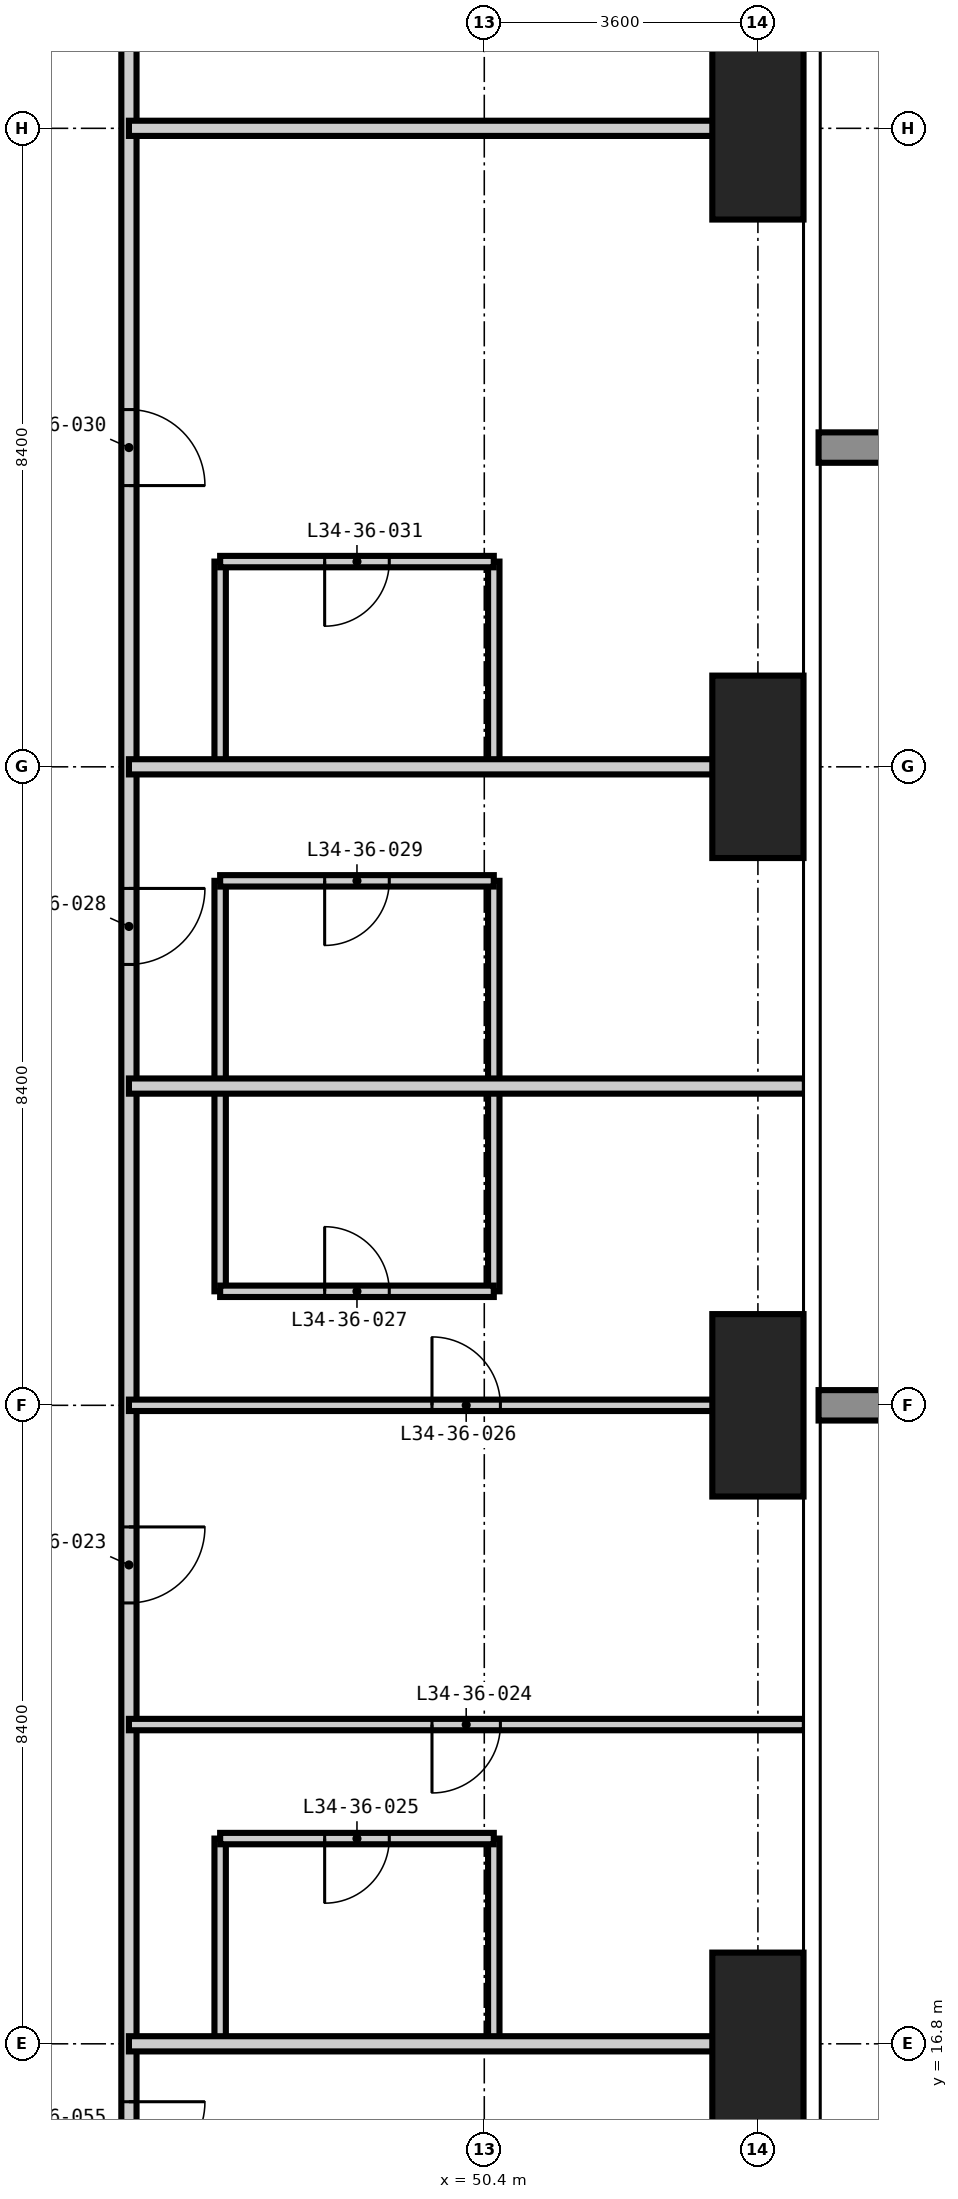
"""IFC4 building model, lengths in metres.
Left out: names, types, materials, properties, quantities, classifications, styles, units other than length and angle.
Written with IfcOpenShell. Run it as: python <this file> out.ifc"""

import sys

from ifc_helpers import new_model, si_unit, direction, frame, frame_2d, origin, origin_2d, place, context, subcontext, project, spatial, rectangle, extrude, element, fill, save


model = new_model("IFC4")
c1 = context("Model", 3, precision=1e-05, world=origin(), true_north=direction((0.0, 1.0)))
c2 = subcontext(c1, "Body", "Model", "MODEL_VIEW")
j1 = project(units=[si_unit("LENGTHUNIT", "METRE"), si_unit("PLANEANGLEUNIT", "RADIAN")], contexts=[c1])
p1 = place(None, origin())
s1 = spatial("IfcSite", under=j1, at=p1, CompositionType="ELEMENT")
p2 = place(p1, origin())
s2 = spatial("IfcBuilding", under=s1, at=p2, CompositionType="ELEMENT")
p3 = place(p2, frame((0.0, 0.0, 133.2)))
s3 = spatial("IfcBuildingStorey", under=s2, at=p3, CompositionType="ELEMENT", Elevation=133.2)
for number, where, z_axis, x_axis in (
    (1, (54.0, 16.8, -0.35), (0.0, 0.0, 1.0), (1.0, 0.0, 0.0)),
    (2, (54.0, 25.2, -0.35), (0.0, 0.0, 1.0), (1.0, 0.0, 0.0)),
    (3, (54.0, 33.6, -0.35), (0.0, 0.0, 1.0), (1.0, 0.0, 0.0)),
    (4, (54.0, 42.0, -0.35), (0.0, 0.0, 1.0), (1.0, 0.0, 0.0)),
):
    element("IfcColumn", number, at=place(p3, frame(where, z_axis=z_axis, x_axis=x_axis)), inside=s3, PredefinedType="COLUMN", context=c2, shape_type="SweptSolid", body=[
        extrude(rectangle(XDim=1.2, YDim=2.4, at=origin_2d()), origin(), (0.0, 0.0, 1.0), 3.6),
    ])
p4 = place(p3, frame((46.925, 16.8, 0.0), z_axis=(0.0, 0.0, 1.0), x_axis=(0.0, 1.0, 0.0)))
e5 = element("IfcWall", 5, at=p4, inside=s3, PredefinedType="PARTITIONING", context=c2, shape_type="SweptSolid", body=[
    extrude(rectangle(XDim=2.7, YDim=0.15, at=frame_2d((1.35, 0.0))), origin(), (0.0, 0.0, 1.0), 3.25),
])
p5 = place(p3, frame((46.925, 26.7, 0.0), z_axis=(0.0, 0.0, 1.0), x_axis=(0.0, 1.0, 0.0)))
e6 = element("IfcWall", 6, at=p5, inside=s3, PredefinedType="PARTITIONING", context=c2, shape_type="SweptSolid", body=[
    extrude(rectangle(XDim=5.4, YDim=0.15, at=frame_2d((2.7, 0.0))), origin(), (0.0, 0.0, 1.0), 3.25),
])
for number, where, z_axis, x_axis in (
    (7, (46.925, 33.6, 0.0), (0.0, 0.0, 1.0), (0.0, 1.0, 0.0)),
    (8, (50.525, 16.8, 0.0), (0.0, 0.0, 1.0), (0.0, 1.0, 0.0)),
):
    element("IfcWall", number, at=place(p3, frame(where, z_axis=z_axis, x_axis=x_axis)), inside=s3, PredefinedType="PARTITIONING", context=c2, shape_type="SweptSolid", body=[
        extrude(rectangle(XDim=2.7, YDim=0.15, at=frame_2d((1.35, 0.0))), origin(), (0.0, 0.0, 1.0), 3.25),
    ])
p6 = place(p3, frame((50.525, 26.7, 0.0), z_axis=(0.0, 0.0, 1.0), x_axis=(0.0, 1.0, 0.0)))
e9 = element("IfcWall", 9, at=p6, inside=s3, PredefinedType="PARTITIONING", context=c2, shape_type="SweptSolid", body=[
    extrude(rectangle(XDim=5.4, YDim=0.15, at=frame_2d((2.7, 0.0))), origin(), (0.0, 0.0, 1.0), 3.25),
])
p7 = place(p3, frame((50.525, 33.6, 0.0), z_axis=(0.0, 0.0, 1.0), x_axis=(0.0, 1.0, 0.0)))
e10 = element("IfcWall", 10, at=p7, inside=s3, PredefinedType="PARTITIONING", context=c2, shape_type="SweptSolid", body=[
    extrude(rectangle(XDim=2.7, YDim=0.15, at=frame_2d((1.35, 0.0))), origin(), (0.0, 0.0, 1.0), 3.25),
])
p8 = place(p3, frame((46.925, 19.5, 0.0), z_axis=(0.0, 0.0, 1.0), x_axis=(1.0, 0.0, 0.0)))
e11 = element("IfcWall", 11, at=p8, inside=s3, PredefinedType="PARTITIONING", context=c2, shape_type="SweptSolid", body=[
    extrude(rectangle(XDim=3.6, YDim=0.15, at=frame_2d((1.8, 0.0))), origin(), (0.0, 0.0, 1.0), 3.25),
])
p9 = place(p8, frame((1.375, 0.0, 0.0)))
e12 = element("IfcOpeningElement", 12, at=p9, cuts=e11, PredefinedType="OPENING", context=c2, shape_type="SweptSolid", body=[
    extrude(rectangle(XDim=0.85, YDim=2.1, at=frame_2d((0.425, 1.05))), frame((0.0, 0.085, 0.0), z_axis=(0.0, -1.0, 0.0), x_axis=(1.0, 0.0, 0.0)), (0.0, 0.0, 1.0), 0.17),
])
p10 = place(p3, frame((46.925, 26.7, 0.0), z_axis=(0.0, 0.0, 1.0), x_axis=(1.0, 0.0, 0.0)))
e13 = element("IfcWall", 13, at=p10, inside=s3, PredefinedType="PARTITIONING", context=c2, shape_type="SweptSolid", body=[
    extrude(rectangle(XDim=3.6, YDim=0.15, at=frame_2d((1.8, 0.0))), origin(), (0.0, 0.0, 1.0), 3.25),
])
p11 = place(p10, frame((1.375, 0.0, 0.0)))
e14 = element("IfcOpeningElement", 14, at=p11, cuts=e13, PredefinedType="OPENING", context=c2, shape_type="SweptSolid", body=[
    extrude(rectangle(XDim=0.85, YDim=2.1, at=frame_2d((0.425, 1.05))), frame((0.0, 0.085, 0.0), z_axis=(0.0, -1.0, 0.0), x_axis=(1.0, 0.0, 0.0)), (0.0, 0.0, 1.0), 0.17),
])
p12 = place(p3, frame((46.925, 32.1, 0.0), z_axis=(0.0, 0.0, 1.0), x_axis=(1.0, 0.0, 0.0)))
e15 = element("IfcWall", 15, at=p12, inside=s3, PredefinedType="PARTITIONING", context=c2, shape_type="SweptSolid", body=[
    extrude(rectangle(XDim=3.6, YDim=0.15, at=frame_2d((1.8, 0.0))), origin(), (0.0, 0.0, 1.0), 3.25),
])
p13 = place(p12, frame((1.375, 0.0, 0.0)))
e16 = element("IfcOpeningElement", 16, at=p13, cuts=e15, PredefinedType="OPENING", context=c2, shape_type="SweptSolid", body=[
    extrude(rectangle(XDim=0.85, YDim=2.1, at=frame_2d((0.425, 1.05))), frame((0.0, 0.085, 0.0), z_axis=(0.0, -1.0, 0.0), x_axis=(1.0, 0.0, 0.0)), (0.0, 0.0, 1.0), 0.17),
])
p14 = place(p3, frame((46.925, 36.3, 0.0), z_axis=(0.0, 0.0, 1.0), x_axis=(1.0, 0.0, 0.0)))
e17 = element("IfcWall", 17, at=p14, inside=s3, PredefinedType="PARTITIONING", context=c2, shape_type="SweptSolid", body=[
    extrude(rectangle(XDim=3.6, YDim=0.15, at=frame_2d((1.8, 0.0))), origin(), (0.0, 0.0, 1.0), 3.25),
])
p15 = place(p14, frame((1.375, 0.0, 0.0)))
e18 = element("IfcOpeningElement", 18, at=p15, cuts=e17, PredefinedType="OPENING", context=c2, shape_type="SweptSolid", body=[
    extrude(rectangle(XDim=0.85, YDim=2.1, at=frame_2d((0.425, 1.05))), frame((0.0, 0.085, 0.0), z_axis=(0.0, -1.0, 0.0), x_axis=(1.0, 0.0, 0.0)), (0.0, 0.0, 1.0), 0.17),
])
p16 = place(p3, frame((45.725, 45.125, 0.0), z_axis=(0.0, 0.0, 1.0), x_axis=(0.0, -1.0, 0.0)))
e19 = element("IfcWall", 19, at=p16, inside=s3, PredefinedType="PARTITIONING", context=c2, shape_type="SweptSolid", body=[
    extrude(rectangle(XDim=30.85, YDim=0.2, at=frame_2d((15.425, 0.0))), origin(), (0.0, 0.0, 1.0), 3.25),
])
p17 = place(p16, frame((21.525, 0.0, 0.0)))
e20 = element("IfcOpeningElement", 20, at=p17, cuts=e19, PredefinedType="OPENING", context=c2, shape_type="SweptSolid", body=[
    extrude(rectangle(XDim=1.0, YDim=2.2, at=frame_2d((0.5, 1.1))), frame((0.0, 0.11, 0.0), z_axis=(0.0, -1.0, 0.0), x_axis=(1.0, 0.0, 0.0)), (0.0, 0.0, 1.0), 0.22),
])
p18 = place(p16, frame((13.125, 0.0, 0.0)))
e21 = element("IfcOpeningElement", 21, at=p18, cuts=e19, PredefinedType="OPENING", context=c2, shape_type="SweptSolid", body=[
    extrude(rectangle(XDim=1.0, YDim=2.2, at=frame_2d((0.5, 1.1))), frame((0.0, 0.11, 0.0), z_axis=(0.0, -1.0, 0.0), x_axis=(1.0, 0.0, 0.0)), (0.0, 0.0, 1.0), 0.22),
])
p19 = place(p16, frame((6.825, 0.0, 0.0)))
e22 = element("IfcOpeningElement", 22, at=p19, cuts=e19, PredefinedType="OPENING", context=c2, shape_type="SweptSolid", body=[
    extrude(rectangle(XDim=1.0, YDim=2.2, at=frame_2d((0.5, 1.1))), frame((0.0, 0.11, 0.0), z_axis=(0.0, -1.0, 0.0), x_axis=(1.0, 0.0, 0.0)), (0.0, 0.0, 1.0), 0.22),
])
p20 = place(p16, frame((29.087, 0.0, 0.0)))
e23 = element("IfcOpeningElement", 23, at=p20, cuts=e19, PredefinedType="OPENING", context=c2, shape_type="SweptSolid", body=[
    extrude(rectangle(XDim=1.0, YDim=2.2, at=frame_2d((0.5, 1.1))), frame((0.0, 0.11, 0.0), z_axis=(0.0, -1.0, 0.0), x_axis=(1.0, 0.0, 0.0)), (0.0, 0.0, 1.0), 0.22),
])
p21 = place(p16, frame((1.063, 0.0, 0.0)))
e24 = element("IfcOpeningElement", 24, at=p21, cuts=e19, PredefinedType="OPENING", context=c2, shape_type="SweptSolid", body=[
    extrude(rectangle(XDim=1.0, YDim=2.2, at=frame_2d((0.5, 1.1))), frame((0.0, 0.11, 0.0), z_axis=(0.0, -1.0, 0.0), x_axis=(1.0, 0.0, 0.0)), (0.0, 0.0, 1.0), 0.22),
])
for number, where, z_axis, x_axis in (
    (25, (45.725, 16.8, 0.0), (0.0, 0.0, 1.0), (1.0, 0.0, 0.0)),
    (26, (45.725, 29.4, 0.0), (0.0, 0.0, 1.0), (1.0, 0.0, 0.0)),
    (27, (45.725, 33.6, 0.0), (0.0, 0.0, 1.0), (1.0, 0.0, 0.0)),
    (28, (45.725, 42.0, 0.0), (0.0, 0.0, 1.0), (1.0, 0.0, 0.0)),
):
    element("IfcWall", number, at=place(p3, frame(where, z_axis=z_axis, x_axis=x_axis)), inside=s3, PredefinedType="PARTITIONING", context=c2, shape_type="SweptSolid", body=[
        extrude(rectangle(XDim=8.893, YDim=0.2, at=frame_2d((4.446, 0.0))), origin(), (0.0, 0.0, 1.0), 3.25),
    ])
p22 = place(p3, frame((45.725, 21.0, 0.0), z_axis=(0.0, 0.0, 1.0), x_axis=(1.0, 0.0, 0.0)))
e29 = element("IfcWall", 29, at=p22, inside=s3, PredefinedType="PARTITIONING", context=c2, shape_type="SweptSolid", body=[
    extrude(rectangle(XDim=8.893, YDim=0.15, at=frame_2d((4.446, 0.0))), origin(), (0.0, 0.0, 1.0), 3.25),
])
p23 = place(p22, frame((3.987, 0.0, 0.0)))
e30 = element("IfcOpeningElement", 30, at=p23, cuts=e29, PredefinedType="OPENING", context=c2, shape_type="SweptSolid", body=[
    extrude(rectangle(XDim=0.9, YDim=2.1, at=frame_2d((0.45, 1.05))), frame((0.0, 0.085, 0.0), z_axis=(0.0, -1.0, 0.0), x_axis=(1.0, 0.0, 0.0)), (0.0, 0.0, 1.0), 0.17),
])
p24 = place(p3, frame((45.725, 25.2, 0.0), z_axis=(0.0, 0.0, 1.0), x_axis=(1.0, 0.0, 0.0)))
e31 = element("IfcWall", 31, at=p24, inside=s3, PredefinedType="PARTITIONING", context=c2, shape_type="SweptSolid", body=[
    extrude(rectangle(XDim=8.893, YDim=0.15, at=frame_2d((4.446, 0.0))), origin(), (0.0, 0.0, 1.0), 3.25),
])
p25 = place(p24, frame((3.987, 0.0, 0.0)))
e32 = element("IfcOpeningElement", 32, at=p25, cuts=e31, PredefinedType="OPENING", context=c2, shape_type="SweptSolid", body=[
    extrude(rectangle(XDim=0.9, YDim=2.1, at=frame_2d((0.45, 1.05))), frame((0.0, 0.085, 0.0), z_axis=(0.0, -1.0, 0.0), x_axis=(1.0, 0.0, 0.0)), (0.0, 0.0, 1.0), 0.17),
])
p26 = place(p17, origin())
e33 = element("IfcDoor", 33, at=p26, inside=s3, OperationType="SINGLE_SWING_LEFT", PredefinedType="DOOR", context=c2, shape_type="SweptSolid", body=[
    extrude(rectangle(XDim=1.0, YDim=2.2, at=frame_2d((0.5, 1.1))), frame((0.0, 0.025, 0.0), z_axis=(0.0, -1.0, 0.0), x_axis=(1.0, 0.0, 0.0)), (0.0, 0.0, 1.0), 0.05),
])
fill(e20, e33)
p27 = place(p23, frame((0.9, 0.0, 0.0), z_axis=(0.0, 0.0, 1.0), x_axis=(-1.0, 0.0, 0.0)))
e34 = element("IfcDoor", 34, at=p27, inside=s3, OperationType="SINGLE_SWING_RIGHT", PredefinedType="DOOR", context=c2, shape_type="SweptSolid", body=[
    extrude(rectangle(XDim=0.9, YDim=2.1, at=frame_2d((0.45, 1.05))), frame((0.0, 0.025, 0.0), z_axis=(0.0, -1.0, 0.0), x_axis=(1.0, 0.0, 0.0)), (0.0, 0.0, 1.0), 0.05),
])
fill(e30, e34)
p28 = place(p9, frame((0.85, 0.0, 0.0), z_axis=(0.0, 0.0, 1.0), x_axis=(-1.0, 0.0, 0.0)))
e35 = element("IfcDoor", 35, at=p28, inside=s3, OperationType="SINGLE_SWING_RIGHT", PredefinedType="DOOR", context=c2, shape_type="SweptSolid", body=[
    extrude(rectangle(XDim=0.85, YDim=2.1, at=frame_2d((0.425, 1.05))), frame((0.0, 0.025, 0.0), z_axis=(0.0, -1.0, 0.0), x_axis=(1.0, 0.0, 0.0)), (0.0, 0.0, 1.0), 0.05),
])
fill(e12, e35)
p29 = place(p25, origin())
e36 = element("IfcDoor", 36, at=p29, inside=s3, OperationType="SINGLE_SWING_LEFT", PredefinedType="DOOR", context=c2, shape_type="SweptSolid", body=[
    extrude(rectangle(XDim=0.9, YDim=2.1, at=frame_2d((0.45, 1.05))), frame((0.0, 0.025, 0.0), z_axis=(0.0, -1.0, 0.0), x_axis=(1.0, 0.0, 0.0)), (0.0, 0.0, 1.0), 0.05),
])
fill(e32, e36)
p30 = place(p11, origin())
e37 = element("IfcDoor", 37, at=p30, inside=s3, OperationType="SINGLE_SWING_LEFT", PredefinedType="DOOR", context=c2, shape_type="SweptSolid", body=[
    extrude(rectangle(XDim=0.85, YDim=2.1, at=frame_2d((0.425, 1.05))), frame((0.0, 0.025, 0.0), z_axis=(0.0, -1.0, 0.0), x_axis=(1.0, 0.0, 0.0)), (0.0, 0.0, 1.0), 0.05),
])
fill(e14, e37)
p31 = place(p18, origin())
e38 = element("IfcDoor", 38, at=p31, inside=s3, OperationType="SINGLE_SWING_LEFT", PredefinedType="DOOR", context=c2, shape_type="SweptSolid", body=[
    extrude(rectangle(XDim=1.0, YDim=2.2, at=frame_2d((0.5, 1.1))), frame((0.0, 0.025, 0.0), z_axis=(0.0, -1.0, 0.0), x_axis=(1.0, 0.0, 0.0)), (0.0, 0.0, 1.0), 0.05),
])
fill(e21, e38)
p32 = place(p13, frame((0.85, 0.0, 0.0), z_axis=(0.0, 0.0, 1.0), x_axis=(-1.0, 0.0, 0.0)))
e39 = element("IfcDoor", 39, at=p32, inside=s3, OperationType="SINGLE_SWING_RIGHT", PredefinedType="DOOR", context=c2, shape_type="SweptSolid", body=[
    extrude(rectangle(XDim=0.85, YDim=2.1, at=frame_2d((0.425, 1.05))), frame((0.0, 0.025, 0.0), z_axis=(0.0, -1.0, 0.0), x_axis=(1.0, 0.0, 0.0)), (0.0, 0.0, 1.0), 0.05),
])
fill(e16, e39)
p33 = place(p19, origin())
e40 = element("IfcDoor", 40, at=p33, inside=s3, OperationType="SINGLE_SWING_RIGHT", PredefinedType="DOOR", context=c2, shape_type="SweptSolid", body=[
    extrude(rectangle(XDim=1.0, YDim=2.2, at=frame_2d((0.5, 1.1))), frame((0.0, 0.025, 0.0), z_axis=(0.0, -1.0, 0.0), x_axis=(1.0, 0.0, 0.0)), (0.0, 0.0, 1.0), 0.05),
])
fill(e22, e40)
p34 = place(p15, frame((0.85, 0.0, 0.0), z_axis=(0.0, 0.0, 1.0), x_axis=(-1.0, 0.0, 0.0)))
e41 = element("IfcDoor", 41, at=p34, inside=s3, OperationType="SINGLE_SWING_RIGHT", PredefinedType="DOOR", context=c2, shape_type="SweptSolid", body=[
    extrude(rectangle(XDim=0.85, YDim=2.1, at=frame_2d((0.425, 1.05))), frame((0.0, 0.025, 0.0), z_axis=(0.0, -1.0, 0.0), x_axis=(1.0, 0.0, 0.0)), (0.0, 0.0, 1.0), 0.05),
])
fill(e18, e41)
p35 = place(p20, origin())
e42 = element("IfcDoor", 42, at=p35, inside=s3, OperationType="SINGLE_SWING_LEFT", PredefinedType="DOOR", context=c2, shape_type="SweptSolid", body=[
    extrude(rectangle(XDim=1.0, YDim=2.2, at=frame_2d((0.5, 1.1))), frame((0.0, 0.025, 0.0), z_axis=(0.0, -1.0, 0.0), x_axis=(1.0, 0.0, 0.0)), (0.0, 0.0, 1.0), 0.05),
])
fill(e23, e42)
save(model, sys.argv[1])
